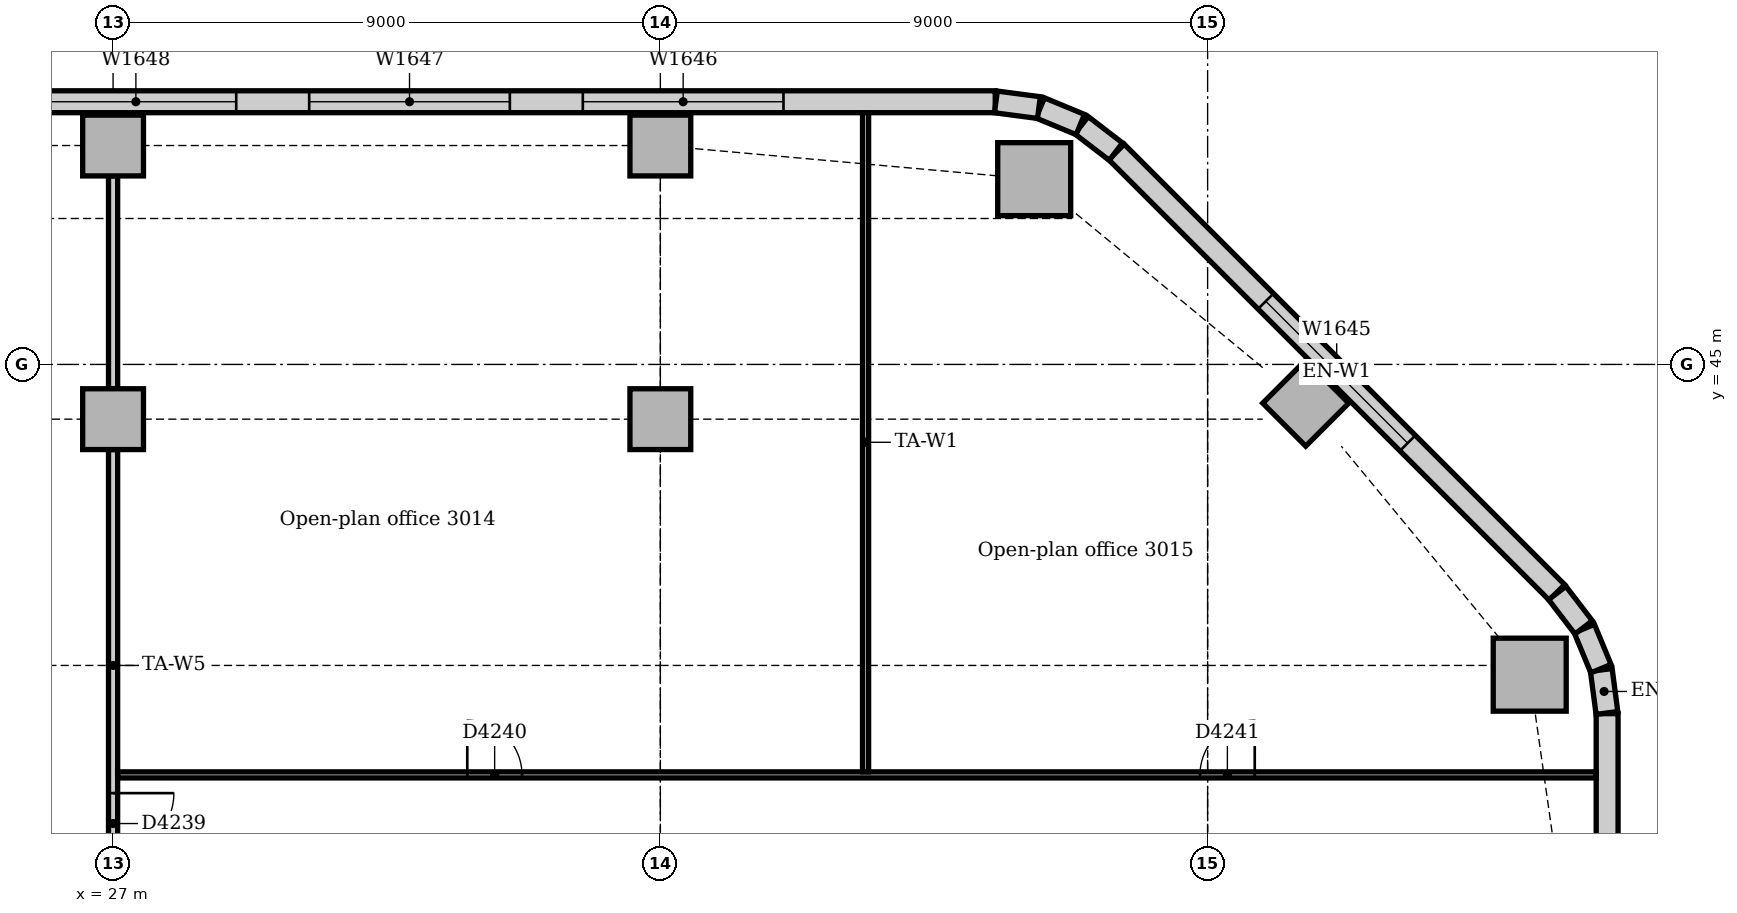
"""IFC4 building model, lengths in metres.
Left out: names, types, materials, properties, quantities, classifications, styles, units other than length and angle.
Written with IfcOpenShell. Run it as: python <this file> out.ifc"""

import sys

from ifc_helpers import new_model, si_unit, direction, frame, frame_2d, origin, origin_2d, place, context, subcontext, project, spatial, rectangle, extrude, element, fill, save


model = new_model("IFC4")
c1 = context("Model", 3, precision=1e-05, world=origin(), true_north=direction((0.0, 1.0)))
c2 = subcontext(c1, "Body", "Model", "MODEL_VIEW")
j1 = project(units=[si_unit("LENGTHUNIT", "METRE"), si_unit("PLANEANGLEUNIT", "RADIAN")], contexts=[c1])
p1 = place(None, origin())
s1 = spatial("IfcSite", under=j1, at=p1, CompositionType="ELEMENT")
p2 = place(p1, origin())
s2 = spatial("IfcBuilding", under=s1, at=p2, CompositionType="ELEMENT")
p3 = place(p2, frame((0.0, 0.0, 128.0)))
s3 = spatial("IfcBuildingStorey", under=s2, at=p3, CompositionType="ELEMENT", Elevation=128.0)
for number, where, z_axis, x_axis in (
    (1, (50.297, 39.898, 0.0), (0.0, 0.0, 1.0), (1.0, 0.0, 0.0)),
    (2, (42.148, 48.047, 0.0), (0.0, 0.0, 1.0), (1.0, 0.0, 0.0)),
):
    element("IfcColumn", number, at=place(p3, frame(where, z_axis=z_axis, x_axis=x_axis)), inside=s3, PredefinedType="COLUMN", context=c2, shape_type="SweptSolid", body=[
        extrude(rectangle(XDim=1.2, YDim=1.2, at=origin_2d()), origin(), (0.0, 0.0, 1.0), 3.85),
    ])
for number, where, z_axis, x_axis in (
    (3, (46.614, 44.364, 0.0), (0.0, 0.0, 1.0), (0.707, 0.707, 0.0)),
    (4, (27.0, 48.6, 0.0), (0.0, 0.0, 1.0), (1.0, 0.0, 0.0)),
    (5, (36.0, 48.6, 0.0), (0.0, 0.0, 1.0), (1.0, 0.0, 0.0)),
    (6, (27.0, 44.1, 0.0), (0.0, 0.0, 1.0), (1.0, 0.0, 0.0)),
    (7, (36.0, 44.1, 0.0), (0.0, 0.0, 1.0), (1.0, 0.0, 0.0)),
):
    element("IfcColumn", number, at=place(p3, frame(where, z_axis=z_axis, x_axis=x_axis)), inside=s3, PredefinedType="COLUMN", context=c2, shape_type="SweptSolid", body=[
        extrude(rectangle(XDim=1.0, YDim=1.0, at=origin_2d()), origin(), (0.0, 0.0, 1.0), 3.85),
    ])
p4 = place(p3, frame((51.57, 14.743, 0.0), z_axis=(0.0, 0.0, 1.0), x_axis=(0.0, 1.0, 0.0)))
e8 = element("IfcWall", 8, at=p4, inside=s3, PredefinedType="STANDARD", context=c2, shape_type="SweptSolid", body=[
    extrude(rectangle(XDim=24.515, YDim=0.36, at=frame_2d((12.257, 0.0))), origin(), (0.0, 0.0, 1.0), 3.85),
])
p5 = place(p4, frame((4.257, 0.0, 0.9)))
e9 = element("IfcOpeningElement", 9, at=p5, cuts=e8, PredefinedType="OPENING", context=c2, shape_type="SweptSolid", body=[
    extrude(rectangle(XDim=1.8, YDim=1.6, at=frame_2d((0.9, 0.8))), frame((0.0, 0.19, 0.0), z_axis=(0.0, -1.0, 0.0), x_axis=(1.0, 0.0, 0.0)), (0.0, 0.0, 1.0), 0.38),
])
p6 = place(p4, frame((8.357, 0.0, 0.9)))
e10 = element("IfcOpeningElement", 10, at=p6, cuts=e8, PredefinedType="OPENING", context=c2, shape_type="SweptSolid", body=[
    extrude(rectangle(XDim=3.3, YDim=1.6, at=frame_2d((1.65, 0.8))), frame((0.0, 0.19, 0.0), z_axis=(0.0, -1.0, 0.0), x_axis=(1.0, 0.0, 0.0)), (0.0, 0.0, 1.0), 0.38),
])
p7 = place(p4, frame((12.857, 0.0, 0.9)))
e11 = element("IfcOpeningElement", 11, at=p7, cuts=e8, PredefinedType="OPENING", context=c2, shape_type="SweptSolid", body=[
    extrude(rectangle(XDim=3.3, YDim=1.6, at=frame_2d((1.65, 0.8))), frame((0.0, 0.19, 0.0), z_axis=(0.0, -1.0, 0.0), x_axis=(1.0, 0.0, 0.0)), (0.0, 0.0, 1.0), 0.38),
])
p8 = place(p4, frame((17.357, 0.0, 0.9)))
e12 = element("IfcOpeningElement", 12, at=p8, cuts=e8, PredefinedType="OPENING", context=c2, shape_type="SweptSolid", body=[
    extrude(rectangle(XDim=3.3, YDim=1.6, at=frame_2d((1.65, 0.8))), frame((0.0, 0.19, 0.0), z_axis=(0.0, -1.0, 0.0), x_axis=(1.0, 0.0, 0.0)), (0.0, 0.0, 1.0), 0.38),
])
p9 = place(p3, frame((50.744, 41.251, 0.0), z_axis=(0.0, 0.0, 1.0), x_axis=(-0.707106781187, 0.707106781187, 0.0)))
e13 = element("IfcWall", 13, at=p9, inside=s3, PredefinedType="STANDARD", context=c2, shape_type="SweptSolid", body=[
    extrude(rectangle(XDim=10.243, YDim=0.36, at=frame_2d((5.121, 0.0))), origin(), (0.0, 0.0, 1.0), 3.85),
])
p10 = place(p9, frame((3.471, 0.0, 0.9)))
e14 = element("IfcOpeningElement", 14, at=p10, cuts=e13, PredefinedType="OPENING", context=c2, shape_type="SweptSolid", body=[
    extrude(rectangle(XDim=3.3, YDim=1.6, at=frame_2d((1.65, 0.8))), frame((0.0, 0.19, 0.0), z_axis=(0.0, -1.0, 0.0), x_axis=(1.0, 0.0, 0.0)), (0.0, 0.0, 1.0), 0.38),
])
p11 = place(p3, frame((41.507, 49.32, 0.0), z_axis=(0.0, 0.0, 1.0), x_axis=(-1.0, 0.0, 0.0)))
e15 = element("IfcWall", 15, at=p11, inside=s3, PredefinedType="STANDARD", context=c2, shape_type="SweptSolid", body=[
    extrude(rectangle(XDim=37.265, YDim=0.36, at=frame_2d((18.632, 0.0))), origin(), (0.0, 0.0, 1.0), 3.85),
])
p12 = place(p11, frame((3.482, 0.0, 0.9)))
e16 = element("IfcOpeningElement", 16, at=p12, cuts=e15, PredefinedType="OPENING", context=c2, shape_type="SweptSolid", body=[
    extrude(rectangle(XDim=3.3, YDim=1.6, at=frame_2d((1.65, 0.8))), frame((0.0, 0.19, 0.0), z_axis=(0.0, -1.0, 0.0), x_axis=(1.0, 0.0, 0.0)), (0.0, 0.0, 1.0), 0.38),
])
p13 = place(p11, frame((7.982, 0.0, 0.9)))
e17 = element("IfcOpeningElement", 17, at=p13, cuts=e15, PredefinedType="OPENING", context=c2, shape_type="SweptSolid", body=[
    extrude(rectangle(XDim=3.3, YDim=1.6, at=frame_2d((1.65, 0.8))), frame((0.0, 0.19, 0.0), z_axis=(0.0, -1.0, 0.0), x_axis=(1.0, 0.0, 0.0)), (0.0, 0.0, 1.0), 0.38),
])
p14 = place(p11, frame((12.482, 0.0, 0.9)))
e18 = element("IfcOpeningElement", 18, at=p14, cuts=e15, PredefinedType="OPENING", context=c2, shape_type="SweptSolid", body=[
    extrude(rectangle(XDim=3.3, YDim=1.6, at=frame_2d((1.65, 0.8))), frame((0.0, 0.19, 0.0), z_axis=(0.0, -1.0, 0.0), x_axis=(1.0, 0.0, 0.0)), (0.0, 0.0, 1.0), 0.38),
])
p15 = place(p11, frame((17.032, 0.0, 0.9)))
e19 = element("IfcOpeningElement", 19, at=p15, cuts=e15, PredefinedType="OPENING", context=c2, shape_type="SweptSolid", body=[
    extrude(rectangle(XDim=1.8, YDim=1.6, at=frame_2d((0.9, 0.8))), frame((0.0, 0.19, 0.0), z_axis=(0.0, -1.0, 0.0), x_axis=(1.0, 0.0, 0.0)), (0.0, 0.0, 1.0), 0.38),
])
p16 = place(p11, frame((21.482, 0.0, 0.9)))
e20 = element("IfcOpeningElement", 20, at=p16, cuts=e15, PredefinedType="OPENING", context=c2, shape_type="SweptSolid", body=[
    extrude(rectangle(XDim=3.3, YDim=1.6, at=frame_2d((1.65, 0.8))), frame((0.0, 0.19, 0.0), z_axis=(0.0, -1.0, 0.0), x_axis=(1.0, 0.0, 0.0)), (0.0, 0.0, 1.0), 0.38),
])
p17 = place(p11, frame((25.982, 0.0, 0.9)))
e21 = element("IfcOpeningElement", 21, at=p17, cuts=e15, PredefinedType="OPENING", context=c2, shape_type="SweptSolid", body=[
    extrude(rectangle(XDim=3.3, YDim=1.6, at=frame_2d((1.65, 0.8))), frame((0.0, 0.19, 0.0), z_axis=(0.0, -1.0, 0.0), x_axis=(1.0, 0.0, 0.0)), (0.0, 0.0, 1.0), 0.38),
])
p18 = place(p11, frame((30.482, 0.0, 0.9)))
e22 = element("IfcOpeningElement", 22, at=p18, cuts=e15, PredefinedType="OPENING", context=c2, shape_type="SweptSolid", body=[
    extrude(rectangle(XDim=3.3, YDim=1.6, at=frame_2d((1.65, 0.8))), frame((0.0, 0.19, 0.0), z_axis=(0.0, -1.0, 0.0), x_axis=(1.0, 0.0, 0.0)), (0.0, 0.0, 1.0), 0.38),
])
for number, where, z_axis, x_axis in (
    (23, (51.567, 39.269, 0.0), (0.0, 0.0, 1.0), (-0.131, 0.991, 0.0)),
    (24, (51.468, 39.997, 0.0), (0.0, 0.0, 1.0), (-0.383, 0.924, 0.0)),
):
    element("IfcWall", number, at=place(p3, frame(where, z_axis=z_axis, x_axis=x_axis)), inside=s3, PredefinedType="STANDARD", context=c2, shape_type="SweptSolid", body=[
        extrude(rectangle(XDim=0.713, YDim=0.36, at=frame_2d((0.356, 0.0))), origin(), (0.0, 0.0, 1.0), 3.85),
    ])
for number, where, z_axis, x_axis in (
    (25, (51.184, 40.675, 0.0), (0.0, 0.0, 1.0), (-0.609, 0.793, 0.0)),
    (26, (43.491, 48.5, 0.0), (0.0, 0.0, 1.0), (-0.793, 0.609, 0.0)),
):
    element("IfcWall", number, at=place(p3, frame(where, z_axis=z_axis, x_axis=x_axis)), inside=s3, PredefinedType="STANDARD", context=c2, shape_type="SweptSolid", body=[
        extrude(rectangle(XDim=0.713, YDim=0.36, at=frame_2d((0.357, 0.0))), origin(), (0.0, 0.0, 1.0), 3.85),
    ])
for number, where, z_axis, x_axis in (
    (27, (42.906, 48.945, 0.0), (0.0, 0.0, 1.0), (-0.924, 0.383, 0.0)),
    (28, (42.226, 49.224, 0.0), (0.0, 0.0, 1.0), (-0.991, 0.131, 0.0)),
):
    element("IfcWall", number, at=place(p3, frame(where, z_axis=z_axis, x_axis=x_axis)), inside=s3, PredefinedType="STANDARD", context=c2, shape_type="SweptSolid", body=[
        extrude(rectangle(XDim=0.713, YDim=0.36, at=frame_2d((0.356, 0.0))), origin(), (0.0, 0.0, 1.0), 3.85),
    ])
p19 = place(p3, frame((27.0, 36.5, 0.0), z_axis=(0.0, 0.0, 1.0), x_axis=(0.0, 1.0, 0.0)))
e29 = element("IfcWall", 29, at=p19, inside=s3, PredefinedType="PARTITIONING", context=c2, shape_type="SweptSolid", body=[
    extrude(rectangle(XDim=7.1, YDim=0.15, at=frame_2d((3.55, 0.0))), origin(), (0.0, 0.0, 1.0), 3.256),
])
p20 = place(p19, frame((0.45, 0.0, 0.0)))
e30 = element("IfcOpeningElement", 30, at=p20, cuts=e29, PredefinedType="OPENING", context=c2, shape_type="SweptSolid", body=[
    extrude(rectangle(XDim=1.0, YDim=2.1, at=frame_2d((0.5, 1.05))), frame((0.0, 0.085, 0.0), z_axis=(0.0, -1.0, 0.0), x_axis=(1.0, 0.0, 0.0)), (0.0, 0.0, 1.0), 0.17),
])
p21 = place(p3, frame((27.0, 44.6, 0.0), z_axis=(0.0, 0.0, 1.0), x_axis=(0.0, 1.0, 0.0)))
e31 = element("IfcWall", 31, at=p21, inside=s3, PredefinedType="PARTITIONING", context=c2, shape_type="SweptSolid", body=[
    extrude(rectangle(XDim=3.5, YDim=0.15, at=frame_2d((1.75, 0.0))), origin(), (0.0, 0.0, 1.0), 3.652),
])
p22 = place(p3, frame((27.075, 38.25, 0.0), z_axis=(0.0, 0.0, 1.0), x_axis=(1.0, 0.0, 0.0)))
e32 = element("IfcWall", 32, at=p22, inside=s3, PredefinedType="PARTITIONING", context=c2, shape_type="SweptSolid", body=[
    extrude(rectangle(XDim=24.315, YDim=0.1, at=frame_2d((12.158, 0.0))), origin(), (0.0, 0.0, 1.0), 3.85),
])
p23 = place(p22, frame((5.75, 0.0, 0.0)))
e33 = element("IfcOpeningElement", 33, at=p23, cuts=e32, PredefinedType="OPENING", context=c2, shape_type="SweptSolid", body=[
    extrude(rectangle(XDim=0.9, YDim=2.1, at=frame_2d((0.45, 1.05))), frame((0.0, 0.06, 0.0), z_axis=(0.0, -1.0, 0.0), x_axis=(1.0, 0.0, 0.0)), (0.0, 0.0, 1.0), 0.12),
])
p24 = place(p22, frame((17.8, 0.0, 0.0)))
e34 = element("IfcOpeningElement", 34, at=p24, cuts=e32, PredefinedType="OPENING", context=c2, shape_type="SweptSolid", body=[
    extrude(rectangle(XDim=0.9, YDim=2.1, at=frame_2d((0.45, 1.05))), frame((0.0, 0.06, 0.0), z_axis=(0.0, -1.0, 0.0), x_axis=(1.0, 0.0, 0.0)), (0.0, 0.0, 1.0), 0.12),
])
p25 = place(p3, frame((39.375, 38.3, 0.0), z_axis=(0.0, 0.0, 1.0), x_axis=(0.0, 1.0, 0.0)))
e35 = element("IfcWall", 35, at=p25, inside=s3, PredefinedType="PARTITIONING", context=c2, shape_type="SweptSolid", body=[
    extrude(rectangle(XDim=10.84, YDim=0.1, at=frame_2d((5.42, 0.0))), origin(), (0.0, 0.0, 1.0), 3.85),
])
p26 = place(p10, origin())
e36 = element("IfcWindow", 36, at=p26, inside=s3, PartitioningType="SINGLE_PANEL", PredefinedType="WINDOW", context=c2, shape_type="SweptSolid", body=[
    extrude(rectangle(XDim=3.3, YDim=1.6, at=frame_2d((1.65, 0.8))), frame((0.0, 0.13, 0.0), z_axis=(0.0, -1.0, 0.0), x_axis=(1.0, 0.0, 0.0)), (0.0, 0.0, 1.0), 0.06),
])
fill(e14, e36)
p27 = place(p12, origin())
e37 = element("IfcWindow", 37, at=p27, inside=s3, PartitioningType="SINGLE_PANEL", PredefinedType="WINDOW", context=c2, shape_type="SweptSolid", body=[
    extrude(rectangle(XDim=3.3, YDim=1.6, at=frame_2d((1.65, 0.8))), frame((0.0, 0.13, 0.0), z_axis=(0.0, -1.0, 0.0), x_axis=(1.0, 0.0, 0.0)), (0.0, 0.0, 1.0), 0.06),
])
fill(e16, e37)
p28 = place(p13, origin())
e38 = element("IfcWindow", 38, at=p28, inside=s3, PartitioningType="SINGLE_PANEL", PredefinedType="WINDOW", context=c2, shape_type="SweptSolid", body=[
    extrude(rectangle(XDim=3.3, YDim=1.6, at=frame_2d((1.65, 0.8))), frame((0.0, 0.13, 0.0), z_axis=(0.0, -1.0, 0.0), x_axis=(1.0, 0.0, 0.0)), (0.0, 0.0, 1.0), 0.06),
])
fill(e17, e38)
p29 = place(p14, origin())
e39 = element("IfcWindow", 39, at=p29, inside=s3, PartitioningType="SINGLE_PANEL", PredefinedType="WINDOW", context=c2, shape_type="SweptSolid", body=[
    extrude(rectangle(XDim=3.3, YDim=1.6, at=frame_2d((1.65, 0.8))), frame((0.0, 0.13, 0.0), z_axis=(0.0, -1.0, 0.0), x_axis=(1.0, 0.0, 0.0)), (0.0, 0.0, 1.0), 0.06),
])
fill(e18, e39)
p30 = place(p20, frame((1.0, 0.0, 0.0), z_axis=(0.0, 0.0, 1.0), x_axis=(-1.0, 0.0, 0.0)))
e40 = element("IfcDoor", 40, at=p30, inside=s3, OperationType="SINGLE_SWING_LEFT", PredefinedType="DOOR", context=c2, shape_type="SweptSolid", body=[
    extrude(rectangle(XDim=1.0, YDim=2.1, at=frame_2d((0.5, 1.05))), frame((0.0, 0.025, 0.0), z_axis=(0.0, -1.0, 0.0), x_axis=(1.0, 0.0, 0.0)), (0.0, 0.0, 1.0), 0.05),
])
fill(e30, e40)
p31 = place(p23, origin())
e41 = element("IfcDoor", 41, at=p31, inside=s3, OperationType="SINGLE_SWING_LEFT", PredefinedType="DOOR", context=c2, shape_type="SweptSolid", body=[
    extrude(rectangle(XDim=0.9, YDim=2.1, at=frame_2d((0.45, 1.05))), frame((0.0, 0.025, 0.0), z_axis=(0.0, -1.0, 0.0), x_axis=(1.0, 0.0, 0.0)), (0.0, 0.0, 1.0), 0.05),
])
fill(e33, e41)
p32 = place(p24, origin())
e42 = element("IfcDoor", 42, at=p32, inside=s3, OperationType="SINGLE_SWING_RIGHT", PredefinedType="DOOR", context=c2, shape_type="SweptSolid", body=[
    extrude(rectangle(XDim=0.9, YDim=2.1, at=frame_2d((0.45, 1.05))), frame((0.0, 0.025, 0.0), z_axis=(0.0, -1.0, 0.0), x_axis=(1.0, 0.0, 0.0)), (0.0, 0.0, 1.0), 0.05),
])
fill(e34, e42)
save(model, sys.argv[1])
